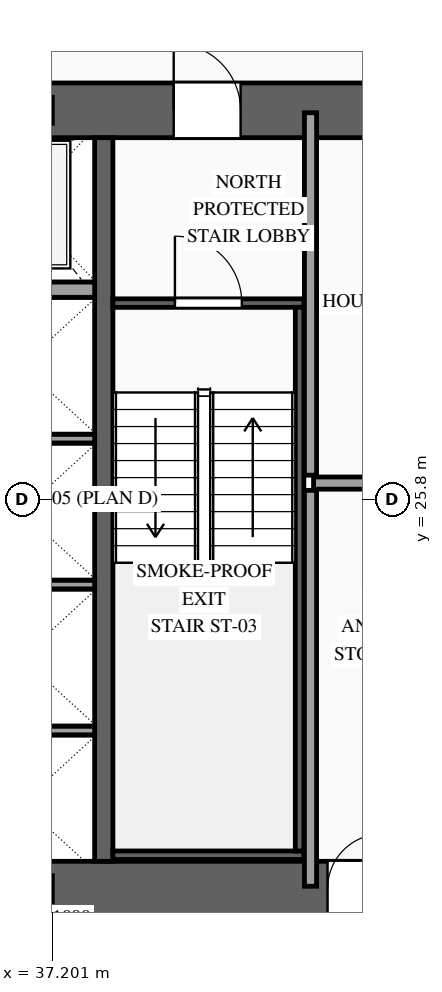
"""IFC4 building model, lengths in metres.
Left out: names, types, materials, properties, quantities, classifications, styles, units other than length and angle.
Written with IfcOpenShell. Run it as: python <this file> out.ifc"""

import sys

from ifc_helpers import new_model, si_unit, direction, frame, frame_2d, origin, origin_2d, place, context, subcontext, project, spatial, rectangle, i_section, extrude, source, transform, mapped, element, fill, save


model = new_model("IFC4")
c1 = context("Model", 3, precision=1e-05, world=origin(), true_north=direction((0.0, 1.0)))
c2 = subcontext(c1, "Body", "Model", "MODEL_VIEW")
j1 = project(units=[si_unit("LENGTHUNIT", "METRE"), si_unit("PLANEANGLEUNIT", "RADIAN")], contexts=[c1])
p1 = place(None, origin())
s1 = spatial("IfcSite", under=j1, at=p1, CompositionType="ELEMENT")
p2 = place(p1, origin())
s2 = spatial("IfcBuilding", under=s1, at=p2, CompositionType="ELEMENT")
p3 = place(p2, frame((0.0, 0.0, 53.2)))
s3 = spatial("IfcBuildingStorey", under=s2, at=p3, CompositionType="ELEMENT", Elevation=53.2)
p4 = place(p3, frame((23.35, 19.4, 0.0), z_axis=(0.0, 0.0, 1.0), x_axis=(1.0, 0.0, 0.0)))
e1 = element("IfcWall", 1, at=p4, inside=s3, PredefinedType="SHEAR", context=c2, shape_type="SweptSolid", body=[
    extrude(rectangle(XDim=27.3, YDim=0.9, at=frame_2d((13.65, 0.0))), origin(), (0.0, 0.0, 1.0), 3.6),
])
p5 = place(p4, frame((2.1, 0.0, 0.0)))
e2 = element("IfcOpeningElement", 2, at=p5, cuts=e1, PredefinedType="OPENING", context=c2, shape_type="SweptSolid", body=[
    extrude(rectangle(XDim=1.1, YDim=2.2, at=frame_2d((0.55, 1.1))), frame((0.0, 0.465, 0.0), z_axis=(0.0, -1.0, 0.0), x_axis=(1.0, 0.0, 0.0)), (0.0, 0.0, 1.0), 0.93),
])
p6 = place(p4, frame((10.0, 0.0, 0.0)))
e3 = element("IfcOpeningElement", 3, at=p6, cuts=e1, PredefinedType="OPENING", context=c2, shape_type="SweptSolid", body=[
    extrude(rectangle(XDim=1.1, YDim=2.2, at=frame_2d((0.55, 1.1))), frame((0.0, 0.465, 0.0), z_axis=(0.0, -1.0, 0.0), x_axis=(1.0, 0.0, 0.0)), (0.0, 0.0, 1.0), 0.93),
])
p7 = place(p4, frame((23.2, 0.0, 0.0)))
e4 = element("IfcOpeningElement", 4, at=p7, cuts=e1, PredefinedType="OPENING", context=c2, shape_type="SweptSolid", body=[
    extrude(rectangle(XDim=1.1, YDim=2.2, at=frame_2d((0.55, 1.1))), frame((0.0, 0.465, 0.0), z_axis=(0.0, -1.0, 0.0), x_axis=(1.0, 0.0, 0.0)), (0.0, 0.0, 1.0), 0.93),
])
p8 = place(p4, frame((19.82, 0.0, 0.0)))
e5 = element("IfcOpeningElement", 5, at=p8, cuts=e1, PredefinedType="OPENING", context=c2, shape_type="SweptSolid", body=[
    extrude(rectangle(XDim=0.9, YDim=2.15, at=frame_2d((0.45, 1.075))), frame((0.0, 0.465, 0.0), z_axis=(0.0, -1.0, 0.0), x_axis=(1.0, 0.0, 0.0)), (0.0, 0.0, 1.0), 0.93),
])
p9 = place(p4, frame((18.38, 0.0, 0.0)))
e6 = element("IfcOpeningElement", 6, at=p9, cuts=e1, PredefinedType="OPENING", context=c2, shape_type="SweptSolid", body=[
    extrude(rectangle(XDim=0.9, YDim=2.15, at=frame_2d((0.45, 1.075))), frame((0.0, 0.465, 0.0), z_axis=(0.0, -1.0, 0.0), x_axis=(1.0, 0.0, 0.0)), (0.0, 0.0, 1.0), 0.93),
])
p10 = place(p3, frame((23.35, 32.2, 0.0), z_axis=(0.0, 0.0, 1.0), x_axis=(1.0, 0.0, 0.0)))
e7 = element("IfcWall", 7, at=p10, inside=s3, PredefinedType="SHEAR", context=c2, shape_type="SweptSolid", body=[
    extrude(rectangle(XDim=27.3, YDim=0.9, at=frame_2d((13.65, 0.0))), origin(), (0.0, 0.0, 1.0), 3.6),
])
p11 = place(p10, frame((4.72, 0.0, 0.0)))
e8 = element("IfcOpeningElement", 8, at=p11, cuts=e7, PredefinedType="OPENING", context=c2, shape_type="SweptSolid", body=[
    extrude(rectangle(XDim=0.9, YDim=2.15, at=frame_2d((0.45, 1.075))), frame((0.0, 0.465, 0.0), z_axis=(0.0, -1.0, 0.0), x_axis=(1.0, 0.0, 0.0)), (0.0, 0.0, 1.0), 0.93),
])
p12 = place(p10, frame((10.0, 0.0, 0.0)))
e9 = element("IfcOpeningElement", 9, at=p12, cuts=e7, PredefinedType="OPENING", context=c2, shape_type="SweptSolid", body=[
    extrude(rectangle(XDim=1.1, YDim=2.2, at=frame_2d((0.55, 1.1))), frame((0.0, 0.465, 0.0), z_axis=(0.0, -1.0, 0.0), x_axis=(1.0, 0.0, 0.0)), (0.0, 0.0, 1.0), 0.93),
])
p13 = place(p10, frame((15.85, 0.0, 0.0)))
e10 = element("IfcOpeningElement", 10, at=p13, cuts=e7, PredefinedType="OPENING", context=c2, shape_type="SweptSolid", body=[
    extrude(rectangle(XDim=1.1, YDim=2.2, at=frame_2d((0.55, 1.1))), frame((0.0, 0.465, 0.0), z_axis=(0.0, -1.0, 0.0), x_axis=(1.0, 0.0, 0.0)), (0.0, 0.0, 1.0), 0.93),
])
p14 = place(p10, frame((19.05, 0.0, 0.0)))
e11 = element("IfcOpeningElement", 11, at=p14, cuts=e7, PredefinedType="OPENING", context=c2, shape_type="SweptSolid", body=[
    extrude(rectangle(XDim=0.9, YDim=2.15, at=frame_2d((0.45, 1.075))), frame((0.0, 0.465, 0.0), z_axis=(0.0, -1.0, 0.0), x_axis=(1.0, 0.0, 0.0)), (0.0, 0.0, 1.0), 0.93),
])
m1 = source(origin(), c2, "Body", "SweptSolid", [
    extrude(rectangle(XDim=11.9, YDim=0.3, at=frame_2d((5.95, 0.0))), origin(), (0.0, 0.0, 1.0), 3.6),
])
p15 = place(p3, frame((38.05, 19.85, 0.0), z_axis=(0.0, 0.0, 1.0), x_axis=(0.0, 1.0, 0.0)))
e12 = element("IfcWall", 12, at=p15, inside=s3, PredefinedType="SOLIDWALL", context=c2, shape_type="MappedRepresentation", body=[
    mapped(m1, transform((0.0, 0.0, 0.0), scale=1.0)),
])
m2 = source(origin(), c2, "Body", "SweptSolid", [
    extrude(i_section(OverallWidth=0.407, OverallDepth=0.428, WebThickness=0.02, FlangeThickness=0.035, at=origin_2d()), origin(), (0.0, 0.0, 1.0), 3.6),
])
for number, where, z_axis, x_axis in (
    (13, (37.0, 19.4, 0.0), (0.0, 0.0, 1.0), (1.0, 0.0, 0.0)),
    (14, (37.0, 32.2, 0.0), (0.0, 0.0, 1.0), (1.0, 0.0, 0.0)),
):
    element("IfcColumn", number, at=place(p3, frame(where, z_axis=z_axis, x_axis=x_axis)), inside=s3, PredefinedType="COLUMN", context=c2, shape_type="MappedRepresentation", body=[
        mapped(m2, transform((0.0, 0.0, 0.0), scale=1.0)),
    ])
m3 = source(origin(), c2, "Body", "SweptSolid", [
    extrude(rectangle(XDim=2.4, YDim=0.14, at=frame_2d((1.2, 0.0))), origin(), (0.0, 0.0, 1.0), 3.38),
])
for number, where, z_axis, x_axis in (
    (15, (35.5, 22.0, 0.0), (0.0, 0.0, 1.0), (1.0, 0.0, 0.0)),
    (16, (35.5, 24.4, 0.0), (0.0, 0.0, 1.0), (1.0, 0.0, 0.0)),
    (17, (35.5, 26.8, 0.0), (0.0, 0.0, 1.0), (1.0, 0.0, 0.0)),
):
    element("IfcWall", number, at=place(p3, frame(where, z_axis=z_axis, x_axis=x_axis)), inside=s3, PredefinedType="SOLIDWALL", context=c2, shape_type="MappedRepresentation", body=[
        mapped(m3, transform((0.0, 0.0, 0.0), scale=1.0)),
    ])
m4 = source(origin(), c2, "Body", "SweptSolid", [
    extrude(rectangle(XDim=2.4, YDim=0.25, at=frame_2d((1.2, 0.0))), origin(), (0.0, 0.0, 1.0), 3.38),
])
p16 = place(p3, frame((35.5, 29.25, 0.0), z_axis=(0.0, 0.0, 1.0), x_axis=(1.0, 0.0, 0.0)))
e18 = element("IfcWall", 18, at=p16, inside=s3, PredefinedType="SOLIDWALL", context=c2, shape_type="MappedRepresentation", body=[
    mapped(m4, transform((0.0, 0.0, 0.0), scale=1.0)),
])
p17 = place(p3, frame((38.2, 29.03, 0.0), z_axis=(0.0, 0.0, 1.0), x_axis=(1.0, 0.0, 0.0)))
e19 = element("IfcWall", 19, at=p17, inside=s3, PredefinedType="SOLIDWALL", context=c2, shape_type="SweptSolid", body=[
    extrude(rectangle(XDim=3.14, YDim=0.14, at=frame_2d((1.57, 0.0))), origin(), (0.0, 0.0, 1.0), 3.38),
])
p18 = place(p17, frame((1.02, 0.0, 0.0)))
e20 = element("IfcOpeningElement", 20, at=p18, cuts=e19, PredefinedType="OPENING", context=c2, shape_type="SweptSolid", body=[
    extrude(rectangle(XDim=1.1, YDim=2.2, at=frame_2d((0.55, 1.1))), frame((0.0, 0.085, 0.0), z_axis=(0.0, -1.0, 0.0), x_axis=(1.0, 0.0, 0.0)), (0.0, 0.0, 1.0), 0.17),
])
m5 = source(origin(), c2, "Body", "SweptSolid", [
    extrude(rectangle(XDim=3.14, YDim=0.14, at=frame_2d((1.57, 0.0))), origin(), (0.0, 0.0, 1.0), 3.38),
])
p19 = place(p3, frame((38.2, 19.95, 0.0), z_axis=(0.0, 0.0, 1.0), x_axis=(1.0, 0.0, 0.0)))
e21 = element("IfcWall", 21, at=p19, inside=s3, PredefinedType="SOLIDWALL", context=c2, shape_type="MappedRepresentation", body=[
    mapped(m5, transform((0.0, 0.0, 0.0), scale=1.0)),
])
m6 = source(origin(), c2, "Body", "SweptSolid", [
    extrude(rectangle(XDim=8.94, YDim=0.14, at=frame_2d((4.47, 0.0))), origin(), (0.0, 0.0, 1.0), 3.38),
])
p20 = place(p3, frame((41.27, 20.02, 0.0), z_axis=(0.0, 0.0, 1.0), x_axis=(0.0, 1.0, 0.0)))
e22 = element("IfcWall", 22, at=p20, inside=s3, PredefinedType="SOLIDWALL", context=c2, shape_type="MappedRepresentation", body=[
    mapped(m6, transform((0.0, 0.0, 0.0), scale=1.0)),
])
m7 = source(origin(), c2, "Body", "SweptSolid", [
    extrude(rectangle(XDim=6.51, YDim=0.2, at=frame_2d((3.255, 0.0))), origin(), (0.0, 0.0, 1.0), 3.38),
])
p21 = place(p3, frame((41.45, 19.44, 0.0), z_axis=(0.0, 0.0, 1.0), x_axis=(0.0, 1.0, 0.0)))
e23 = element("IfcWall", 23, at=p21, inside=s3, PredefinedType="PARTITIONING", context=c2, shape_type="MappedRepresentation", body=[
    mapped(m7, transform((0.0, 0.0, 0.0), scale=1.0)),
])
m8 = source(origin(), c2, "Body", "SweptSolid", [
    extrude(rectangle(XDim=2.7, YDim=0.2, at=frame_2d((1.35, 0.0))), origin(), (0.0, 0.0, 1.0), 3.38),
])
p22 = place(p3, frame((41.5, 26.07, 0.0), z_axis=(0.0, 0.0, 1.0), x_axis=(1.0, 0.0, 0.0)))
e24 = element("IfcWall", 24, at=p22, inside=s3, PredefinedType="PARTITIONING", context=c2, shape_type="MappedRepresentation", body=[
    mapped(m8, transform((0.0, 0.0, 0.0), scale=1.0)),
])
m9 = source(origin(), c2, "Body", "SweptSolid", [
    extrude(rectangle(XDim=5.96, YDim=0.2, at=frame_2d((2.98, 0.0))), origin(), (0.0, 0.0, 1.0), 3.38),
])
p23 = place(p3, frame((41.45, 26.2, 0.0), z_axis=(0.0, 0.0, 1.0), x_axis=(0.0, 1.0, 0.0)))
e25 = element("IfcWall", 25, at=p23, inside=s3, PredefinedType="PARTITIONING", context=c2, shape_type="MappedRepresentation", body=[
    mapped(m9, transform((0.0, 0.0, 0.0), scale=1.0)),
])
m10 = source(origin(), c2, "Body", "SweptSolid", [
    extrude(rectangle(XDim=1.1, YDim=2.2, at=frame_2d((0.55, 1.1))), frame((0.0, 0.025, 0.0), z_axis=(0.0, -1.0, 0.0), x_axis=(1.0, 0.0, 0.0)), (0.0, 0.0, 1.0), 0.05),
])
p24 = place(p18, origin())
e26 = element("IfcDoor", 26, at=p24, inside=s3, OperationType="SINGLE_SWING_LEFT", PredefinedType="DOOR", context=c2, shape_type="MappedRepresentation", body=[
    mapped(m10, transform((0.0, 0.0, 0.0), scale=1.0)),
])
fill(e20, e26)
p25 = place(p13, origin())
e27 = element("IfcDoor", 27, at=p25, inside=s3, OperationType="SINGLE_SWING_LEFT", PredefinedType="DOOR", context=c2, shape_type="MappedRepresentation", body=[
    mapped(m10, transform((0.0, 0.0, 0.0), scale=1.0)),
])
fill(e10, e27)
m11 = source(origin(), c2, "Body", "SweptSolid", [
    extrude(rectangle(XDim=0.9, YDim=2.15, at=frame_2d((0.45, 1.075))), frame((0.0, 0.025, 0.0), z_axis=(0.0, -1.0, 0.0), x_axis=(1.0, 0.0, 0.0)), (0.0, 0.0, 1.0), 0.05),
])
p26 = place(p9, origin())
e28 = element("IfcDoor", 28, at=p26, inside=s3, OperationType="SINGLE_SWING_RIGHT", PredefinedType="DOOR", context=c2, shape_type="MappedRepresentation", body=[
    mapped(m11, transform((0.0, 0.0, 0.0), scale=1.0)),
])
fill(e6, e28)
save(model, sys.argv[1])
